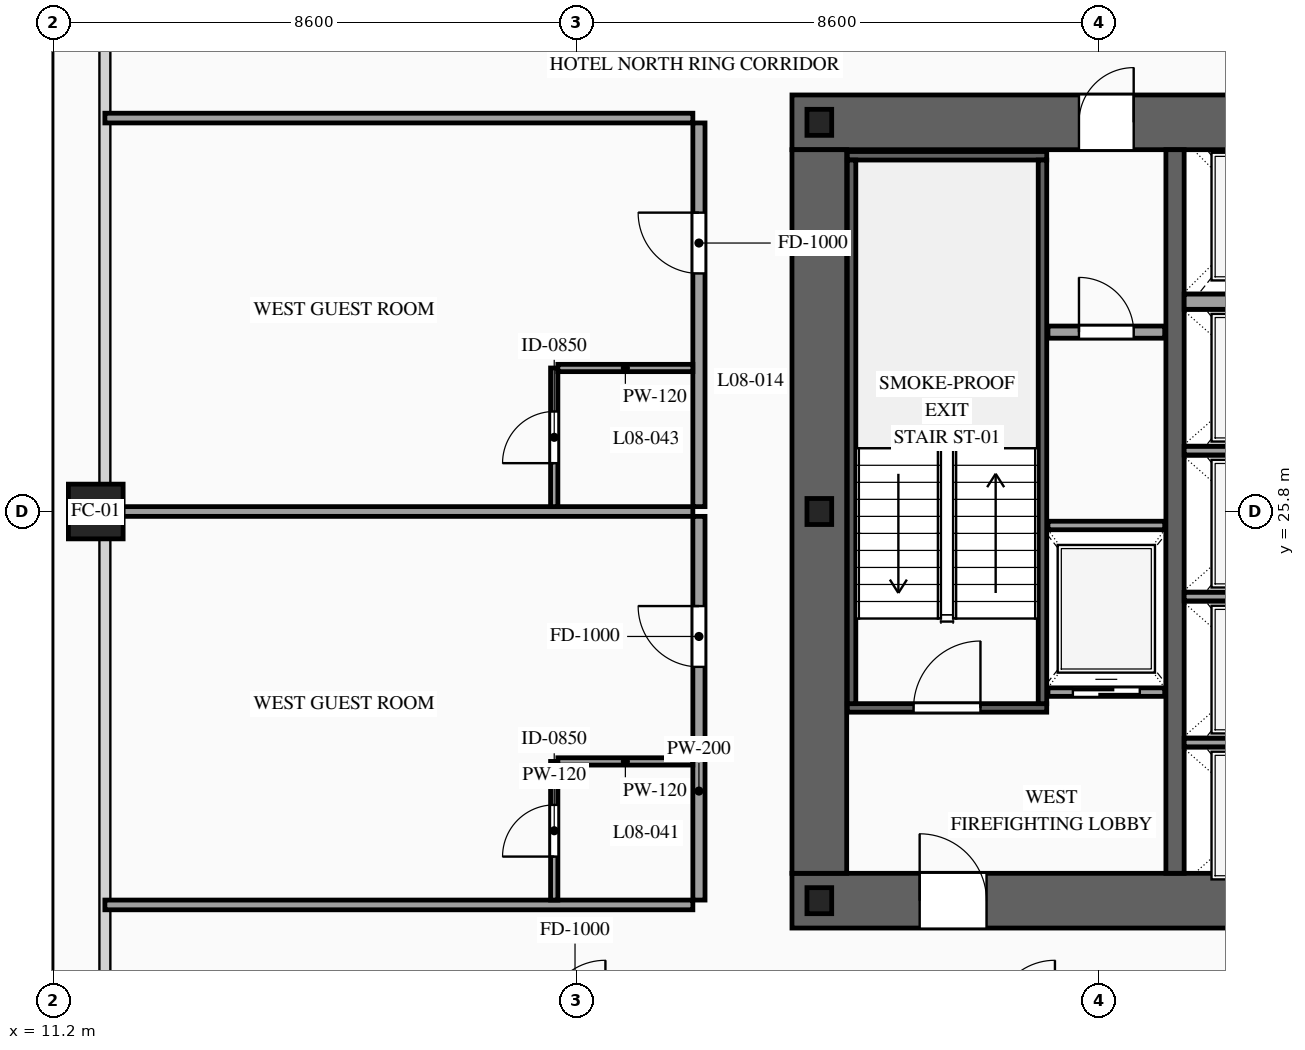
"""IFC4 building model, lengths in metres.
Left out: names, types, materials, properties, quantities, classifications, styles, units other than length and angle.
Written with IfcOpenShell. Run it as: python <this file> out.ifc"""

import sys

from ifc_helpers import new_model, si_unit, direction, frame, frame_2d, origin, origin_2d, place, context, subcontext, project, spatial, rectangle, hollow_rectangle, i_section, extrude, source, transform, mapped, element, fill, save


model = new_model("IFC4")
c1 = context("Model", 3, precision=1e-05, world=origin(), true_north=direction((0.0, 1.0)))
c2 = subcontext(c1, "Body", "Model", "MODEL_VIEW")
j1 = project(units=[si_unit("LENGTHUNIT", "METRE"), si_unit("PLANEANGLEUNIT", "RADIAN")], contexts=[c1])
p1 = place(None, origin())
s1 = spatial("IfcSite", under=j1, at=p1, CompositionType="ELEMENT")
p2 = place(p1, origin())
s2 = spatial("IfcBuilding", under=s1, at=p2, CompositionType="ELEMENT")
p3 = place(p2, frame((0.0, 0.0, 34.2)))
s3 = spatial("IfcBuildingStorey", under=s2, at=p3, CompositionType="ELEMENT", Elevation=34.2)
p4 = place(p3, frame((23.35, 19.4, 0.0), z_axis=(0.0, 0.0, 1.0), x_axis=(1.0, 0.0, 0.0)))
e1 = element("IfcWall", 1, at=p4, inside=s3, PredefinedType="SHEAR", context=c2, shape_type="SweptSolid", body=[
    extrude(rectangle(XDim=27.3, YDim=0.9, at=frame_2d((13.65, 0.0))), origin(), (0.0, 0.0, 1.0), 3.6),
])
p5 = place(p4, frame((2.1, 0.0, 0.0)))
e2 = element("IfcOpeningElement", 2, at=p5, cuts=e1, PredefinedType="OPENING", context=c2, shape_type="SweptSolid", body=[
    extrude(rectangle(XDim=1.1, YDim=2.2, at=frame_2d((0.55, 1.1))), frame((0.0, 0.465, 0.0), z_axis=(0.0, -1.0, 0.0), x_axis=(1.0, 0.0, 0.0)), (0.0, 0.0, 1.0), 0.93),
])
p6 = place(p4, frame((10.0, 0.0, 0.0)))
e3 = element("IfcOpeningElement", 3, at=p6, cuts=e1, PredefinedType="OPENING", context=c2, shape_type="SweptSolid", body=[
    extrude(rectangle(XDim=1.1, YDim=2.2, at=frame_2d((0.55, 1.1))), frame((0.0, 0.465, 0.0), z_axis=(0.0, -1.0, 0.0), x_axis=(1.0, 0.0, 0.0)), (0.0, 0.0, 1.0), 0.93),
])
p7 = place(p4, frame((23.2, 0.0, 0.0)))
e4 = element("IfcOpeningElement", 4, at=p7, cuts=e1, PredefinedType="OPENING", context=c2, shape_type="SweptSolid", body=[
    extrude(rectangle(XDim=1.1, YDim=2.2, at=frame_2d((0.55, 1.1))), frame((0.0, 0.465, 0.0), z_axis=(0.0, -1.0, 0.0), x_axis=(1.0, 0.0, 0.0)), (0.0, 0.0, 1.0), 0.93),
])
p8 = place(p4, frame((19.82, 0.0, 0.0)))
e5 = element("IfcOpeningElement", 5, at=p8, cuts=e1, PredefinedType="OPENING", context=c2, shape_type="SweptSolid", body=[
    extrude(rectangle(XDim=0.9, YDim=2.15, at=frame_2d((0.45, 1.075))), frame((0.0, 0.465, 0.0), z_axis=(0.0, -1.0, 0.0), x_axis=(1.0, 0.0, 0.0)), (0.0, 0.0, 1.0), 0.93),
])
p9 = place(p4, frame((18.38, 0.0, 0.0)))
e6 = element("IfcOpeningElement", 6, at=p9, cuts=e1, PredefinedType="OPENING", context=c2, shape_type="SweptSolid", body=[
    extrude(rectangle(XDim=0.9, YDim=2.15, at=frame_2d((0.45, 1.075))), frame((0.0, 0.465, 0.0), z_axis=(0.0, -1.0, 0.0), x_axis=(1.0, 0.0, 0.0)), (0.0, 0.0, 1.0), 0.93),
])
p10 = place(p3, frame((23.35, 32.2, 0.0), z_axis=(0.0, 0.0, 1.0), x_axis=(1.0, 0.0, 0.0)))
e7 = element("IfcWall", 7, at=p10, inside=s3, PredefinedType="SHEAR", context=c2, shape_type="SweptSolid", body=[
    extrude(rectangle(XDim=27.3, YDim=0.9, at=frame_2d((13.65, 0.0))), origin(), (0.0, 0.0, 1.0), 3.6),
])
p11 = place(p10, frame((4.72, 0.0, 0.0)))
e8 = element("IfcOpeningElement", 8, at=p11, cuts=e7, PredefinedType="OPENING", context=c2, shape_type="SweptSolid", body=[
    extrude(rectangle(XDim=0.9, YDim=2.15, at=frame_2d((0.45, 1.075))), frame((0.0, 0.465, 0.0), z_axis=(0.0, -1.0, 0.0), x_axis=(1.0, 0.0, 0.0)), (0.0, 0.0, 1.0), 0.93),
])
p12 = place(p10, frame((10.0, 0.0, 0.0)))
e9 = element("IfcOpeningElement", 9, at=p12, cuts=e7, PredefinedType="OPENING", context=c2, shape_type="SweptSolid", body=[
    extrude(rectangle(XDim=1.1, YDim=2.2, at=frame_2d((0.55, 1.1))), frame((0.0, 0.465, 0.0), z_axis=(0.0, -1.0, 0.0), x_axis=(1.0, 0.0, 0.0)), (0.0, 0.0, 1.0), 0.93),
])
p13 = place(p10, frame((15.85, 0.0, 0.0)))
e10 = element("IfcOpeningElement", 10, at=p13, cuts=e7, PredefinedType="OPENING", context=c2, shape_type="SweptSolid", body=[
    extrude(rectangle(XDim=1.1, YDim=2.2, at=frame_2d((0.55, 1.1))), frame((0.0, 0.465, 0.0), z_axis=(0.0, -1.0, 0.0), x_axis=(1.0, 0.0, 0.0)), (0.0, 0.0, 1.0), 0.93),
])
m1 = source(origin(), c2, "Body", "SweptSolid", [
    extrude(rectangle(XDim=11.9, YDim=0.9, at=frame_2d((5.95, 0.0))), origin(), (0.0, 0.0, 1.0), 3.6),
])
p14 = place(p3, frame((23.8, 19.85, 0.0), z_axis=(0.0, 0.0, 1.0), x_axis=(0.0, 1.0, 0.0)))
e11 = element("IfcWall", 11, at=p14, inside=s3, PredefinedType="SHEAR", context=c2, shape_type="MappedRepresentation", body=[
    mapped(m1, transform((0.0, 0.0, 0.0), scale=1.0)),
])
m2 = source(origin(), c2, "Body", "SweptSolid", [
    extrude(rectangle(XDim=11.9, YDim=0.3, at=frame_2d((5.95, 0.0))), origin(), (0.0, 0.0, 1.0), 3.6),
])
p15 = place(p3, frame((29.65, 19.85, 0.0), z_axis=(0.0, 0.0, 1.0), x_axis=(0.0, 1.0, 0.0)))
e12 = element("IfcWall", 12, at=p15, inside=s3, PredefinedType="SOLIDWALL", context=c2, shape_type="MappedRepresentation", body=[
    mapped(m2, transform((0.0, 0.0, 0.0), scale=1.0)),
])
m3 = source(origin(), c2, "Body", "SweptSolid", [
    extrude(i_section(OverallWidth=0.407, OverallDepth=0.428, WebThickness=0.02, FlangeThickness=0.035, at=origin_2d()), origin(), (0.0, 0.0, 1.0), 3.6),
])
for number, where, z_axis, x_axis in (
    (13, (23.8, 19.4, 0.0), (0.0, 0.0, 1.0), (1.0, 0.0, 0.0)),
    (14, (23.8, 25.8, 0.0), (0.0, 0.0, 1.0), (1.0, 0.0, 0.0)),
    (15, (23.8, 32.2, 0.0), (0.0, 0.0, 1.0), (1.0, 0.0, 0.0)),
):
    element("IfcColumn", number, at=place(p3, frame(where, z_axis=z_axis, x_axis=x_axis)), inside=s3, PredefinedType="COLUMN", context=c2, shape_type="MappedRepresentation", body=[
        mapped(m3, transform((0.0, 0.0, 0.0), scale=1.0)),
    ])
m4 = source(origin(), c2, "Body", "SweptSolid", [
    extrude(hollow_rectangle(XDim=0.9, YDim=0.9, WallThickness=0.042, at=origin_2d()), origin(), (0.0, 0.0, 1.0), 3.6),
])
p16 = place(p3, frame((11.9, 25.8, 0.0), z_axis=(0.0, 0.0, 1.0), x_axis=(1.0, 0.0, 0.0)))
e16 = element("IfcColumn", 16, at=p16, inside=s3, PredefinedType="COLUMN", context=c2, shape_type="MappedRepresentation", body=[
    mapped(m4, transform((0.0, 0.0, 0.0), scale=1.0)),
])
p17 = place(p3, frame((27.56, 22.83, 0.0), z_axis=(0.0, 0.0, 1.0), x_axis=(1.0, 0.0, 0.0)))
e17 = element("IfcWall", 17, at=p17, inside=s3, PredefinedType="SOLIDWALL", context=c2, shape_type="SweptSolid", body=[
    extrude(rectangle(XDim=1.92, YDim=0.14, at=frame_2d((0.96, 0.0))), origin(), (0.0, 0.0, 1.0), 3.38),
])
p18 = place(p17, frame((0.41, 0.0, 0.0)))
e18 = element("IfcOpeningElement", 18, at=p18, cuts=e17, PredefinedType="OPENING", context=c2, shape_type="SweptSolid", body=[
    extrude(rectangle(XDim=1.1, YDim=2.2, at=frame_2d((0.55, 1.1))), frame((0.0, 0.085, 0.0), z_axis=(0.0, -1.0, 0.0), x_axis=(1.0, 0.0, 0.0)), (0.0, 0.0, 1.0), 0.17),
])
m5 = source(origin(), c2, "Body", "SweptSolid", [
    extrude(rectangle(XDim=1.92, YDim=0.14, at=frame_2d((0.96, 0.0))), origin(), (0.0, 0.0, 1.0), 3.38),
])
p19 = place(p3, frame((27.56, 25.57, 0.0), z_axis=(0.0, 0.0, 1.0), x_axis=(1.0, 0.0, 0.0)))
e19 = element("IfcWall", 19, at=p19, inside=s3, PredefinedType="SOLIDWALL", context=c2, shape_type="MappedRepresentation", body=[
    mapped(m5, transform((0.0, 0.0, 0.0), scale=1.0)),
])
m6 = source(origin(), c2, "Body", "SweptSolid", [
    extrude(rectangle(XDim=2.5, YDim=0.14, at=frame_2d((1.25, 0.0))), origin(), (0.0, 0.0, 1.0), 3.38),
])
for number, where, z_axis, x_axis in (
    (20, (29.8, 22.0, 0.0), (0.0, 0.0, 1.0), (1.0, 0.0, 0.0)),
    (21, (29.8, 24.4, 0.0), (0.0, 0.0, 1.0), (1.0, 0.0, 0.0)),
    (22, (29.8, 26.8, 0.0), (0.0, 0.0, 1.0), (1.0, 0.0, 0.0)),
):
    element("IfcWall", number, at=place(p3, frame(where, z_axis=z_axis, x_axis=x_axis)), inside=s3, PredefinedType="SOLIDWALL", context=c2, shape_type="MappedRepresentation", body=[
        mapped(m6, transform((0.0, 0.0, 0.0), scale=1.0)),
    ])
m7 = source(origin(), c2, "Body", "SweptSolid", [
    extrude(rectangle(XDim=2.5, YDim=0.25, at=frame_2d((1.25, 0.0))), origin(), (0.0, 0.0, 1.0), 3.38),
])
p20 = place(p3, frame((29.8, 29.25, 0.0), z_axis=(0.0, 0.0, 1.0), x_axis=(1.0, 0.0, 0.0)))
e23 = element("IfcWall", 23, at=p20, inside=s3, PredefinedType="SOLIDWALL", context=c2, shape_type="MappedRepresentation", body=[
    mapped(m7, transform((0.0, 0.0, 0.0), scale=1.0)),
])
p21 = place(p3, frame((24.26, 22.57, 0.0), z_axis=(0.0, 0.0, 1.0), x_axis=(1.0, 0.0, 0.0)))
e24 = element("IfcWall", 24, at=p21, inside=s3, PredefinedType="SOLIDWALL", context=c2, shape_type="SweptSolid", body=[
    extrude(rectangle(XDim=3.28, YDim=0.14, at=frame_2d((1.64, 0.0))), origin(), (0.0, 0.0, 1.0), 3.38),
])
p22 = place(p21, frame((1.09, 0.0, 0.0)))
e25 = element("IfcOpeningElement", 25, at=p22, cuts=e24, PredefinedType="OPENING", context=c2, shape_type="SweptSolid", body=[
    extrude(rectangle(XDim=1.1, YDim=2.2, at=frame_2d((0.55, 1.1))), frame((0.0, 0.085, 0.0), z_axis=(0.0, -1.0, 0.0), x_axis=(1.0, 0.0, 0.0)), (0.0, 0.0, 1.0), 0.17),
])
m8 = source(origin(), c2, "Body", "SweptSolid", [
    extrude(rectangle(XDim=3.28, YDim=0.14, at=frame_2d((1.64, 0.0))), origin(), (0.0, 0.0, 1.0), 3.38),
])
p23 = place(p3, frame((24.26, 31.65, 0.0), z_axis=(0.0, 0.0, 1.0), x_axis=(1.0, 0.0, 0.0)))
e26 = element("IfcWall", 26, at=p23, inside=s3, PredefinedType="SOLIDWALL", context=c2, shape_type="MappedRepresentation", body=[
    mapped(m8, transform((0.0, 0.0, 0.0), scale=1.0)),
])
m9 = source(origin(), c2, "Body", "SweptSolid", [
    extrude(rectangle(XDim=8.94, YDim=0.14, at=frame_2d((4.47, 0.0))), origin(), (0.0, 0.0, 1.0), 3.38),
])
for number, where, z_axis, x_axis in (
    (27, (24.33, 22.64, 0.0), (0.0, 0.0, 1.0), (0.0, 1.0, 0.0)),
    (28, (27.47, 22.64, 0.0), (0.0, 0.0, 1.0), (0.0, 1.0, 0.0)),
):
    element("IfcWall", number, at=place(p3, frame(where, z_axis=z_axis, x_axis=x_axis)), inside=s3, PredefinedType="SOLIDWALL", context=c2, shape_type="MappedRepresentation", body=[
        mapped(m9, transform((0.0, 0.0, 0.0), scale=1.0)),
    ])
p24 = place(p3, frame((27.56, 28.75, 0.0), z_axis=(0.0, 0.0, 1.0), x_axis=(1.0, 0.0, 0.0)))
e29 = element("IfcWall", 29, at=p24, inside=s3, PredefinedType="PARTITIONING", context=c2, shape_type="SweptSolid", body=[
    extrude(rectangle(XDim=1.92, YDim=0.2, at=frame_2d((0.96, 0.0))), origin(), (0.0, 0.0, 1.0), 3.38),
])
p25 = place(p24, frame((0.51, 0.0, 0.0)))
e30 = element("IfcOpeningElement", 30, at=p25, cuts=e29, PredefinedType="OPENING", context=c2, shape_type="SweptSolid", body=[
    extrude(rectangle(XDim=0.9, YDim=2.15, at=frame_2d((0.45, 1.075))), frame((0.0, 0.115, 0.0), z_axis=(0.0, -1.0, 0.0), x_axis=(1.0, 0.0, 0.0)), (0.0, 0.0, 1.0), 0.23),
])
p26 = place(p3, frame((21.82, 19.41, 0.0), z_axis=(0.0, 0.0, 1.0), x_axis=(0.0, 1.0, 0.0)))
e31 = element("IfcWall", 31, at=p26, inside=s3, PredefinedType="PARTITIONING", context=c2, shape_type="SweptSolid", body=[
    extrude(rectangle(XDim=6.31, YDim=0.2, at=frame_2d((3.155, 0.0))), origin(), (0.0, 0.0, 1.0), 3.38),
])
p27 = place(p26, frame((3.835, 0.0, 0.0)))
e32 = element("IfcOpeningElement", 32, at=p27, cuts=e31, PredefinedType="OPENING", context=c2, shape_type="SweptSolid", body=[
    extrude(rectangle(XDim=1.0, YDim=2.2, at=frame_2d((0.5, 1.1))), frame((0.0, 0.115, 0.0), z_axis=(0.0, -1.0, 0.0), x_axis=(1.0, 0.0, 0.0)), (0.0, 0.0, 1.0), 0.23),
])
m10 = source(origin(), c2, "Body", "SweptSolid", [
    extrude(rectangle(XDim=9.67, YDim=0.16, at=frame_2d((4.835, 0.0))), origin(), (0.0, 0.0, 1.0), 2.575),
])
p28 = place(p3, frame((12.05, 25.8, 0.0), z_axis=(0.0, 0.0, 1.0), x_axis=(1.0, 0.0, 0.0)))
e33 = element("IfcWall", 33, at=p28, inside=s3, PredefinedType="PARTITIONING", context=c2, shape_type="MappedRepresentation", body=[
    mapped(m10, transform((0.0, 0.0, 0.0), scale=1.0)),
])
m11 = source(origin(), c2, "Body", "SweptSolid", [
    extrude(rectangle(XDim=9.67, YDim=0.16, at=frame_2d((4.835, 0.0))), origin(), (0.0, 0.0, 1.0), 2.875),
])
p29 = place(p3, frame((12.05, 19.33, 0.0), z_axis=(0.0, 0.0, 1.0), x_axis=(1.0, 0.0, 0.0)))
e34 = element("IfcWall", 34, at=p29, inside=s3, PredefinedType="PARTITIONING", context=c2, shape_type="MappedRepresentation", body=[
    mapped(m11, transform((0.0, 0.0, 0.0), scale=1.0)),
])
p30 = place(p3, frame((19.44, 19.41, 0.0), z_axis=(0.0, 0.0, 1.0), x_axis=(0.0, 1.0, 0.0)))
e35 = element("IfcWall", 35, at=p30, inside=s3, PredefinedType="PARTITIONING", context=c2, shape_type="SweptSolid", body=[
    extrude(rectangle(XDim=2.28, YDim=0.12, at=frame_2d((1.14, 0.0))), origin(), (0.0, 0.0, 1.0), 3.38),
])
p31 = place(p30, frame((0.715, 0.0, 0.0)))
e36 = element("IfcOpeningElement", 36, at=p31, cuts=e35, PredefinedType="OPENING", context=c2, shape_type="SweptSolid", body=[
    extrude(rectangle(XDim=0.85, YDim=2.1, at=frame_2d((0.425, 1.05))), frame((0.0, 0.075, 0.0), z_axis=(0.0, -1.0, 0.0), x_axis=(1.0, 0.0, 0.0)), (0.0, 0.0, 1.0), 0.15),
])
m12 = source(origin(), c2, "Body", "SweptSolid", [
    extrude(rectangle(XDim=2.22, YDim=0.12, at=frame_2d((1.11, 0.0))), origin(), (0.0, 0.0, 1.0), 3.38),
])
p32 = place(p3, frame((19.5, 21.69, 0.0), z_axis=(0.0, 0.0, 1.0), x_axis=(1.0, 0.0, 0.0)))
e37 = element("IfcWall", 37, at=p32, inside=s3, PredefinedType="PARTITIONING", context=c2, shape_type="MappedRepresentation", body=[
    mapped(m12, transform((0.0, 0.0, 0.0), scale=1.0)),
])
p33 = place(p3, frame((21.82, 25.88, 0.0), z_axis=(0.0, 0.0, 1.0), x_axis=(0.0, 1.0, 0.0)))
e38 = element("IfcWall", 38, at=p33, inside=s3, PredefinedType="PARTITIONING", context=c2, shape_type="SweptSolid", body=[
    extrude(rectangle(XDim=6.31, YDim=0.2, at=frame_2d((3.155, 0.0))), origin(), (0.0, 0.0, 1.0), 3.38),
])
p34 = place(p33, frame((3.835, 0.0, 0.0)))
e39 = element("IfcOpeningElement", 39, at=p34, cuts=e38, PredefinedType="OPENING", context=c2, shape_type="SweptSolid", body=[
    extrude(rectangle(XDim=1.0, YDim=2.2, at=frame_2d((0.5, 1.1))), frame((0.0, 0.115, 0.0), z_axis=(0.0, -1.0, 0.0), x_axis=(1.0, 0.0, 0.0)), (0.0, 0.0, 1.0), 0.23),
])
p35 = place(p3, frame((12.05, 32.27, 0.0), z_axis=(0.0, 0.0, 1.0), x_axis=(1.0, 0.0, 0.0)))
e40 = element("IfcWall", 40, at=p35, inside=s3, PredefinedType="PARTITIONING", context=c2, shape_type="MappedRepresentation", body=[
    mapped(m11, transform((0.0, 0.0, 0.0), scale=1.0)),
])
p36 = place(p3, frame((19.44, 25.88, 0.0), z_axis=(0.0, 0.0, 1.0), x_axis=(0.0, 1.0, 0.0)))
e41 = element("IfcWall", 41, at=p36, inside=s3, PredefinedType="PARTITIONING", context=c2, shape_type="SweptSolid", body=[
    extrude(rectangle(XDim=2.28, YDim=0.12, at=frame_2d((1.14, 0.0))), origin(), (0.0, 0.0, 1.0), 3.38),
])
p37 = place(p36, frame((0.715, 0.0, 0.0)))
e42 = element("IfcOpeningElement", 42, at=p37, cuts=e41, PredefinedType="OPENING", context=c2, shape_type="SweptSolid", body=[
    extrude(rectangle(XDim=0.85, YDim=2.1, at=frame_2d((0.425, 1.05))), frame((0.0, 0.075, 0.0), z_axis=(0.0, -1.0, 0.0), x_axis=(1.0, 0.0, 0.0)), (0.0, 0.0, 1.0), 0.15),
])
p38 = place(p3, frame((19.5, 28.16, 0.0), z_axis=(0.0, 0.0, 1.0), x_axis=(1.0, 0.0, 0.0)))
e43 = element("IfcWall", 43, at=p38, inside=s3, PredefinedType="PARTITIONING", context=c2, shape_type="MappedRepresentation", body=[
    mapped(m12, transform((0.0, 0.0, 0.0), scale=1.0)),
])
m13 = source(origin(), c2, "Body", "SweptSolid", [
    extrude(rectangle(XDim=1.1, YDim=2.2, at=frame_2d((0.55, 1.1))), frame((0.0, 0.025, 0.0), z_axis=(0.0, -1.0, 0.0), x_axis=(1.0, 0.0, 0.0)), (0.0, 0.0, 1.0), 0.05),
])
p39 = place(p18, origin())
e44 = element("IfcDoor", 44, at=p39, inside=s3, OperationType="SLIDING_TO_LEFT", PredefinedType="DOOR", context=c2, shape_type="MappedRepresentation", body=[
    mapped(m13, transform((0.0, 0.0, 0.0), scale=1.0)),
])
fill(e18, e44)
m14 = source(origin(), c2, "Body", "SweptSolid", [
    extrude(rectangle(XDim=1.1, YDim=2.2, at=frame_2d((0.55, 1.1))), frame((0.0, 0.025, 0.0), z_axis=(0.0, -1.0, 0.0), x_axis=(1.0, 0.0, 0.0)), (0.0, 0.0, 1.0), 0.05),
])
p40 = place(p22, origin())
e45 = element("IfcDoor", 45, at=p40, inside=s3, OperationType="SINGLE_SWING_RIGHT", PredefinedType="DOOR", context=c2, shape_type="MappedRepresentation", body=[
    mapped(m14, transform((0.0, 0.0, 0.0), scale=1.0)),
])
fill(e25, e45)
p41 = place(p5, origin())
e46 = element("IfcDoor", 46, at=p41, inside=s3, OperationType="SINGLE_SWING_LEFT", PredefinedType="DOOR", context=c2, shape_type="MappedRepresentation", body=[
    mapped(m14, transform((0.0, 0.0, 0.0), scale=1.0)),
])
fill(e2, e46)
m15 = source(origin(), c2, "Body", "SweptSolid", [
    extrude(rectangle(XDim=0.9, YDim=2.15, at=frame_2d((0.45, 1.075))), frame((0.0, 0.025, 0.0), z_axis=(0.0, -1.0, 0.0), x_axis=(1.0, 0.0, 0.0)), (0.0, 0.0, 1.0), 0.05),
])
p42 = place(p11, origin())
e47 = element("IfcDoor", 47, at=p42, inside=s3, OperationType="SINGLE_SWING_RIGHT", PredefinedType="DOOR", context=c2, shape_type="MappedRepresentation", body=[
    mapped(m15, transform((0.0, 0.0, 0.0), scale=1.0)),
])
fill(e8, e47)
p43 = place(p25, origin())
e48 = element("IfcDoor", 48, at=p43, inside=s3, OperationType="SINGLE_SWING_LEFT", PredefinedType="DOOR", context=c2, shape_type="MappedRepresentation", body=[
    mapped(m15, transform((0.0, 0.0, 0.0), scale=1.0)),
])
fill(e30, e48)
m16 = source(origin(), c2, "Body", "SweptSolid", [
    extrude(rectangle(XDim=1.0, YDim=2.2, at=frame_2d((0.5, 1.1))), frame((0.0, 0.025, 0.0), z_axis=(0.0, -1.0, 0.0), x_axis=(1.0, 0.0, 0.0)), (0.0, 0.0, 1.0), 0.05),
])
p44 = place(p27, origin())
e49 = element("IfcDoor", 49, at=p44, inside=s3, OperationType="SINGLE_SWING_RIGHT", PredefinedType="DOOR", context=c2, shape_type="MappedRepresentation", body=[
    mapped(m16, transform((0.0, 0.0, 0.0), scale=1.0)),
])
fill(e32, e49)
m17 = source(origin(), c2, "Body", "SweptSolid", [
    extrude(rectangle(XDim=0.85, YDim=2.1, at=frame_2d((0.425, 1.05))), frame((0.0, 0.025, 0.0), z_axis=(0.0, -1.0, 0.0), x_axis=(1.0, 0.0, 0.0)), (0.0, 0.0, 1.0), 0.05),
])
p45 = place(p31, origin())
e50 = element("IfcDoor", 50, at=p45, inside=s3, OperationType="SINGLE_SWING_LEFT", PredefinedType="DOOR", context=c2, shape_type="MappedRepresentation", body=[
    mapped(m17, transform((0.0, 0.0, 0.0), scale=1.0)),
])
fill(e36, e50)
p46 = place(p34, origin())
e51 = element("IfcDoor", 51, at=p46, inside=s3, OperationType="SINGLE_SWING_RIGHT", PredefinedType="DOOR", context=c2, shape_type="MappedRepresentation", body=[
    mapped(m16, transform((0.0, 0.0, 0.0), scale=1.0)),
])
fill(e39, e51)
p47 = place(p37, origin())
e52 = element("IfcDoor", 52, at=p47, inside=s3, OperationType="SINGLE_SWING_LEFT", PredefinedType="DOOR", context=c2, shape_type="MappedRepresentation", body=[
    mapped(m17, transform((0.0, 0.0, 0.0), scale=1.0)),
])
fill(e42, e52)
save(model, sys.argv[1])
